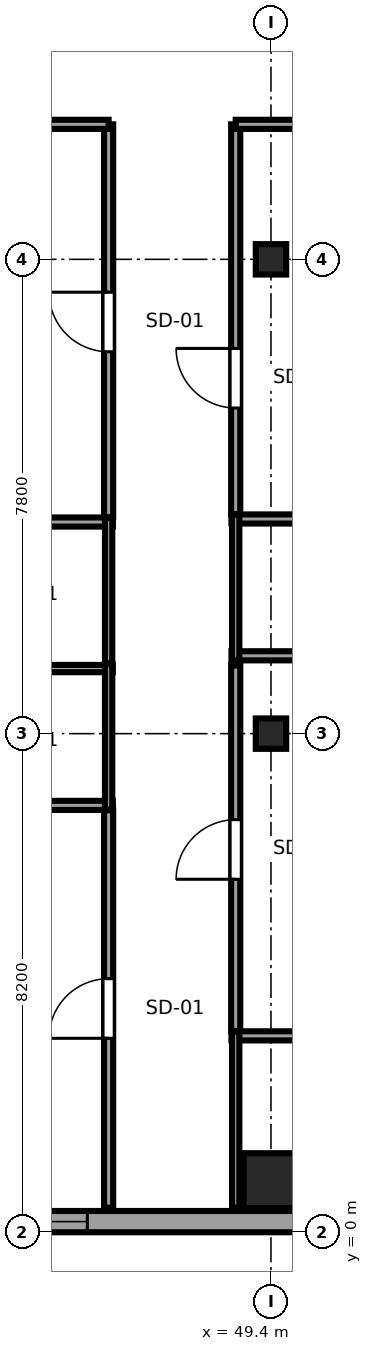
"""IFC4 building model, lengths in metres.
Left out: names, types, materials, properties, quantities, classifications, styles, units other than length and angle.
Written with IfcOpenShell. Run it as: python <this file> out.ifc"""

import sys

from ifc_helpers import new_model, si_unit, direction, frame, frame_2d, origin, origin_2d, place, context, subcontext, project, spatial, rectangle, i_section, extrude, source, transform, mapped, element, fill, save


model = new_model("IFC4")
c1 = context("Model", 3, precision=1e-05, world=origin(), true_north=direction((0.0, 1.0)))
c2 = subcontext(c1, "Body", "Model", "MODEL_VIEW")
j1 = project(units=[si_unit("LENGTHUNIT", "METRE"), si_unit("PLANEANGLEUNIT", "RADIAN")], contexts=[c1])
p1 = place(None, origin())
s1 = spatial("IfcSite", under=j1, at=p1, CompositionType="ELEMENT")
p2 = place(p1, origin())
s2 = spatial("IfcBuilding", under=s1, at=p2, CompositionType="ELEMENT")
p3 = place(p2, frame((0.0, 0.0, 92.35)))
s3 = spatial("IfcBuildingStorey", under=s2, at=p3, CompositionType="ELEMENT", Elevation=92.35)
m1 = source(origin(), c2, "Body", "SweptSolid", [
    extrude(rectangle(XDim=0.9, YDim=0.9, at=origin_2d()), origin(), (0.0, 0.0, 1.0), 3.55),
])
p4 = place(p3, frame((49.4, 0.85, 0.0), z_axis=(0.0, 0.0, 1.0), x_axis=(1.0, 0.0, 0.0)))
e1 = element("IfcColumn", 1, at=p4, inside=s3, PredefinedType="COLUMN", context=c2, shape_type="MappedRepresentation", body=[
    mapped(m1, transform((0.0, 0.0, 0.0), x_axis=(1.0, 0.0, 0.0), y_axis=(0.0, 1.0, 0.0), z_axis=(0.0, 0.0, 1.0), scale=1.0)),
])
m2 = source(origin(), c2, "Body", "SweptSolid", [
    extrude(i_section(OverallWidth=0.5, OverallDepth=0.5, WebThickness=0.022, FlangeThickness=0.034, at=origin_2d()), origin(), (0.0, 0.0, 1.0), 3.55),
])
for number, where, z_axis, x_axis in (
    (2, (49.4, 8.2, 0.0), (0.0, 0.0, 1.0), (1.0, 0.0, 0.0)),
    (3, (49.4, 16.0, 0.0), (0.0, 0.0, 1.0), (1.0, 0.0, 0.0)),
):
    element("IfcColumn", number, at=place(p3, frame(where, z_axis=z_axis, x_axis=x_axis)), inside=s3, PredefinedType="COLUMN", context=c2, shape_type="MappedRepresentation", body=[
        mapped(m2, transform((0.0, 0.0, 0.0), x_axis=(1.0, 0.0, 0.0), y_axis=(0.0, 1.0, 0.0), z_axis=(0.0, 0.0, 1.0), scale=1.0)),
    ])
p5 = place(p3, frame((34.375, 0.175, 0.0), z_axis=(0.0, 0.0, 1.0), x_axis=(1.0, 0.0, 0.0)))
e4 = element("IfcWall", 4, at=p5, inside=s3, PredefinedType="SOLIDWALL", context=c2, shape_type="SweptSolid", body=[
    extrude(rectangle(XDim=18.008, YDim=0.35, at=frame_2d((9.004, 0.0))), origin(), (0.0, 0.0, 1.0), 3.25),
])
p6 = place(p5, frame((1.801, 0.0, 0.68)))
e5 = element("IfcOpeningElement", 5, at=p6, cuts=e4, PredefinedType="OPENING", context=c2, shape_type="SweptSolid", body=[
    extrude(rectangle(XDim=1.8, YDim=1.85, at=frame_2d((0.9, 0.925))), frame((0.0, 0.185, 0.0), z_axis=(0.0, -1.0, 0.0), x_axis=(1.0, 0.0, 0.0)), (0.0, 0.0, 1.0), 0.37),
])
p7 = place(p5, frame((4.953, 0.0, 0.68)))
e6 = element("IfcOpeningElement", 6, at=p7, cuts=e4, PredefinedType="OPENING", context=c2, shape_type="SweptSolid", body=[
    extrude(rectangle(XDim=1.8, YDim=1.85, at=frame_2d((0.9, 0.925))), frame((0.0, 0.185, 0.0), z_axis=(0.0, -1.0, 0.0), x_axis=(1.0, 0.0, 0.0)), (0.0, 0.0, 1.0), 0.37),
])
p8 = place(p5, frame((10.205, 0.0, 0.68)))
e7 = element("IfcOpeningElement", 7, at=p8, cuts=e4, PredefinedType="OPENING", context=c2, shape_type="SweptSolid", body=[
    extrude(rectangle(XDim=1.8, YDim=1.85, at=frame_2d((0.9, 0.925))), frame((0.0, 0.185, 0.0), z_axis=(0.0, -1.0, 0.0), x_axis=(1.0, 0.0, 0.0)), (0.0, 0.0, 1.0), 0.37),
])
p9 = place(p3, frame((44.21, 7.02, 0.0), z_axis=(0.0, 0.0, 1.0), x_axis=(1.0, 0.0, 0.0)))
e8 = element("IfcWall", 8, at=p9, inside=s3, PredefinedType="PARTITIONING", context=c2, shape_type="SweptSolid", body=[
    extrude(rectangle(XDim=2.59, YDim=0.15, at=frame_2d((1.295, 0.0))), origin(), (0.0, 0.0, 1.0), 3.25),
])
p10 = place(p3, frame((44.21, 9.27, 0.0), z_axis=(0.0, 0.0, 1.0), x_axis=(1.0, 0.0, 0.0)))
e9 = element("IfcWall", 9, at=p10, inside=s3, PredefinedType="PLUMBINGWALL", context=c2, shape_type="SweptSolid", body=[
    extrude(rectangle(XDim=2.59, YDim=0.12, at=frame_2d((1.295, 0.0))), origin(), (0.0, 0.0, 1.0), 3.25),
])
p11 = place(p3, frame((46.73, 6.95, 0.0), z_axis=(0.0, 0.0, 1.0), x_axis=(0.0, 1.0, 0.0)))
e10 = element("IfcWall", 10, at=p11, inside=s3, PredefinedType="PLUMBINGWALL", context=c2, shape_type="SweptSolid", body=[
    extrude(rectangle(XDim=2.39, YDim=0.12, at=frame_2d((1.195, 0.0))), origin(), (0.0, 0.0, 1.0), 3.25),
])
p12 = place(p3, frame((44.21, 11.68, 0.0), z_axis=(0.0, 0.0, 1.0), x_axis=(1.0, 0.0, 0.0)))
e11 = element("IfcWall", 11, at=p12, inside=s3, PredefinedType="PARTITIONING", context=c2, shape_type="SweptSolid", body=[
    extrude(rectangle(XDim=2.59, YDim=0.15, at=frame_2d((1.295, 0.0))), origin(), (0.0, 0.0, 1.0), 3.25),
])
p13 = place(p3, frame((46.73, 9.36, 0.0), z_axis=(0.0, 0.0, 1.0), x_axis=(0.0, 1.0, 0.0)))
e12 = element("IfcWall", 12, at=p13, inside=s3, PredefinedType="PLUMBINGWALL", context=c2, shape_type="SweptSolid", body=[
    extrude(rectangle(XDim=2.39, YDim=0.12, at=frame_2d((1.195, 0.0))), origin(), (0.0, 0.0, 1.0), 3.25),
])
p14 = place(p3, frame((48.75, 3.23, 0.0), z_axis=(0.0, 0.0, 1.0), x_axis=(1.0, 0.0, 0.0)))
e13 = element("IfcWall", 13, at=p14, inside=s3, PredefinedType="PARTITIONING", context=c2, shape_type="SweptSolid", body=[
    extrude(rectangle(XDim=3.74, YDim=0.15, at=frame_2d((1.87, 0.0))), origin(), (0.0, 0.0, 1.0), 3.25),
])
p15 = place(p3, frame((48.82, 0.405, 0.0), z_axis=(0.0, 0.0, 1.0), x_axis=(0.0, 1.0, 0.0)))
e14 = element("IfcWall", 14, at=p15, inside=s3, PredefinedType="PLUMBINGWALL", context=c2, shape_type="SweptSolid", body=[
    extrude(rectangle(XDim=2.895, YDim=0.12, at=frame_2d((1.448, 0.0))), origin(), (0.0, 0.0, 1.0), 3.25),
])
p16 = place(p3, frame((48.75, 9.48, 0.0), z_axis=(0.0, 0.0, 1.0), x_axis=(1.0, 0.0, 0.0)))
e15 = element("IfcWall", 15, at=p16, inside=s3, PredefinedType="PARTITIONING", context=c2, shape_type="SweptSolid", body=[
    extrude(rectangle(XDim=7.845, YDim=0.15, at=frame_2d((3.922, 0.0))), origin(), (0.0, 0.0, 1.0), 3.25),
])
p17 = place(p3, frame((48.75, 11.73, 0.0), z_axis=(0.0, 0.0, 1.0), x_axis=(1.0, 0.0, 0.0)))
e16 = element("IfcWall", 16, at=p17, inside=s3, PredefinedType="PARTITIONING", context=c2, shape_type="SweptSolid", body=[
    extrude(rectangle(XDim=2.59, YDim=0.15, at=frame_2d((1.295, 0.0))), origin(), (0.0, 0.0, 1.0), 3.25),
])
p18 = place(p3, frame((48.82, 9.41, 0.0), z_axis=(0.0, 0.0, 1.0), x_axis=(0.0, 1.0, 0.0)))
e17 = element("IfcWall", 17, at=p18, inside=s3, PredefinedType="PLUMBINGWALL", context=c2, shape_type="SweptSolid", body=[
    extrude(rectangle(XDim=2.39, YDim=0.12, at=frame_2d((1.195, 0.0))), origin(), (0.0, 0.0, 1.0), 3.25),
])
p19 = place(p3, frame((46.73, 0.405, 0.0), z_axis=(0.0, 0.0, 1.0), x_axis=(0.0, 1.0, 0.0)))
e18 = element("IfcWall", 18, at=p19, inside=s3, PredefinedType="PARTITIONING", context=c2, shape_type="SweptSolid", body=[
    extrude(rectangle(XDim=6.535, YDim=0.15, at=frame_2d((3.268, 0.0))), origin(), (0.0, 0.0, 1.0), 3.25),
])
p20 = place(p19, frame((2.785, 0.0, 0.0)))
e19 = element("IfcOpeningElement", 19, at=p20, cuts=e18, PredefinedType="OPENING", context=c2, shape_type="SweptSolid", body=[
    extrude(rectangle(XDim=0.98, YDim=2.12, at=frame_2d((0.49, 1.06))), frame((0.0, 0.085, 0.0), z_axis=(0.0, -1.0, 0.0), x_axis=(1.0, 0.0, 0.0)), (0.0, 0.0, 1.0), 0.17),
])
p21 = place(p3, frame((46.73, 11.76, 0.0), z_axis=(0.0, 0.0, 1.0), x_axis=(0.0, 1.0, 0.0)))
e20 = element("IfcWall", 20, at=p21, inside=s3, PredefinedType="PARTITIONING", context=c2, shape_type="SweptSolid", body=[
    extrude(rectangle(XDim=6.46, YDim=0.15, at=frame_2d((3.23, 0.0))), origin(), (0.0, 0.0, 1.0), 3.25),
])
p22 = place(p21, frame((2.72, 0.0, 0.0)))
e21 = element("IfcOpeningElement", 21, at=p22, cuts=e20, PredefinedType="OPENING", context=c2, shape_type="SweptSolid", body=[
    extrude(rectangle(XDim=0.98, YDim=2.12, at=frame_2d((0.49, 1.06))), frame((0.0, 0.085, 0.0), z_axis=(0.0, -1.0, 0.0), x_axis=(1.0, 0.0, 0.0)), (0.0, 0.0, 1.0), 0.17),
])
p23 = place(p3, frame((34.65, 18.22, 0.0), z_axis=(0.0, 0.0, 1.0), x_axis=(1.0, 0.0, 0.0)))
e22 = element("IfcWall", 22, at=p23, inside=s3, PredefinedType="PARTITIONING", context=c2, shape_type="SweptSolid", body=[
    extrude(rectangle(XDim=12.08, YDim=0.15, at=frame_2d((6.04, 0.0))), origin(), (0.0, 0.0, 1.0), 3.25),
])
p24 = place(p3, frame((48.82, 3.31, 0.0), z_axis=(0.0, 0.0, 1.0), x_axis=(0.0, 1.0, 0.0)))
e23 = element("IfcWall", 23, at=p24, inside=s3, PredefinedType="PARTITIONING", context=c2, shape_type="SweptSolid", body=[
    extrude(rectangle(XDim=6.01, YDim=0.15, at=frame_2d((3.005, 0.0))), origin(), (0.0, 0.0, 1.0), 3.25),
])
p25 = place(p24, frame((2.495, 0.0, 0.0)))
e24 = element("IfcOpeningElement", 24, at=p25, cuts=e23, PredefinedType="OPENING", context=c2, shape_type="SweptSolid", body=[
    extrude(rectangle(XDim=0.98, YDim=2.12, at=frame_2d((0.49, 1.06))), frame((0.0, 0.085, 0.0), z_axis=(0.0, -1.0, 0.0), x_axis=(1.0, 0.0, 0.0)), (0.0, 0.0, 1.0), 0.17),
])
p26 = place(p3, frame((48.82, 11.81, 0.0), z_axis=(0.0, 0.0, 1.0), x_axis=(0.0, 1.0, 0.0)))
e25 = element("IfcWall", 25, at=p26, inside=s3, PredefinedType="PARTITIONING", context=c2, shape_type="SweptSolid", body=[
    extrude(rectangle(XDim=6.41, YDim=0.15, at=frame_2d((3.205, 0.0))), origin(), (0.0, 0.0, 1.0), 3.25),
])
p27 = place(p26, frame((1.745, 0.0, 0.0)))
e26 = element("IfcOpeningElement", 26, at=p27, cuts=e25, PredefinedType="OPENING", context=c2, shape_type="SweptSolid", body=[
    extrude(rectangle(XDim=0.98, YDim=2.12, at=frame_2d((0.49, 1.06))), frame((0.0, 0.085, 0.0), z_axis=(0.0, -1.0, 0.0), x_axis=(1.0, 0.0, 0.0)), (0.0, 0.0, 1.0), 0.17),
])
p28 = place(p3, frame((48.82, 18.22, 0.0), z_axis=(0.0, 0.0, 1.0), x_axis=(1.0, 0.0, 0.0)))
e27 = element("IfcWall", 27, at=p28, inside=s3, PredefinedType="PARTITIONING", context=c2, shape_type="SweptSolid", body=[
    extrude(rectangle(XDim=7.775, YDim=0.15, at=frame_2d((3.887, 0.0))), origin(), (0.0, 0.0, 1.0), 3.25),
])
m3 = source(origin(), c2, "Body", "SweptSolid", [
    extrude(rectangle(XDim=1.8, YDim=1.85, at=frame_2d((0.9, 0.925))), frame((0.0, 0.09, 0.0), z_axis=(0.0, -1.0, 0.0), x_axis=(1.0, 0.0, 0.0)), (0.0, 0.0, 1.0), 0.06),
])
p29 = place(p8, origin())
e28 = element("IfcWindow", 28, at=p29, inside=s3, PartitioningType="TRIPLE_PANEL_HORIZONTAL", PredefinedType="WINDOW", context=c2, shape_type="MappedRepresentation", body=[
    mapped(m3, transform((0.0, 0.0, 0.0), x_axis=(1.0, 0.0, 0.0), y_axis=(0.0, 1.0, 0.0), z_axis=(0.0, 0.0, 1.0), scale=1.0)),
])
fill(e7, e28)
m4 = source(origin(), c2, "Body", "SweptSolid", [
    extrude(rectangle(XDim=0.98, YDim=2.12, at=frame_2d((0.49, 1.06))), frame((0.0, 0.025, 0.0), z_axis=(0.0, -1.0, 0.0), x_axis=(1.0, 0.0, 0.0)), (0.0, 0.0, 1.0), 0.05),
])
p30 = place(p20, origin())
e29 = element("IfcDoor", 29, at=p30, inside=s3, OperationType="SINGLE_SWING_LEFT", PredefinedType="DOOR", context=c2, shape_type="MappedRepresentation", body=[
    mapped(m4, transform((0.0, 0.0, 0.0), x_axis=(1.0, 0.0, 0.0), y_axis=(0.0, 1.0, 0.0), z_axis=(0.0, 0.0, 1.0), scale=1.0)),
])
fill(e19, e29)
p31 = place(p22, origin())
e30 = element("IfcDoor", 30, at=p31, inside=s3, OperationType="SINGLE_SWING_RIGHT", PredefinedType="DOOR", context=c2, shape_type="MappedRepresentation", body=[
    mapped(m4, transform((0.0, 0.0, 0.0), x_axis=(1.0, 0.0, 0.0), y_axis=(0.0, 1.0, 0.0), z_axis=(0.0, 0.0, 1.0), scale=1.0)),
])
fill(e21, e30)
p32 = place(p25, origin())
e31 = element("IfcDoor", 31, at=p32, inside=s3, OperationType="SINGLE_SWING_LEFT", PredefinedType="DOOR", context=c2, shape_type="MappedRepresentation", body=[
    mapped(m4, transform((0.0, 0.0, 0.0), x_axis=(1.0, 0.0, 0.0), y_axis=(0.0, 1.0, 0.0), z_axis=(0.0, 0.0, 1.0), scale=1.0)),
])
fill(e24, e31)
p33 = place(p27, origin())
e32 = element("IfcDoor", 32, at=p33, inside=s3, OperationType="SINGLE_SWING_RIGHT", PredefinedType="DOOR", context=c2, shape_type="MappedRepresentation", body=[
    mapped(m4, transform((0.0, 0.0, 0.0), x_axis=(1.0, 0.0, 0.0), y_axis=(0.0, 1.0, 0.0), z_axis=(0.0, 0.0, 1.0), scale=1.0)),
])
fill(e26, e32)
save(model, sys.argv[1])
